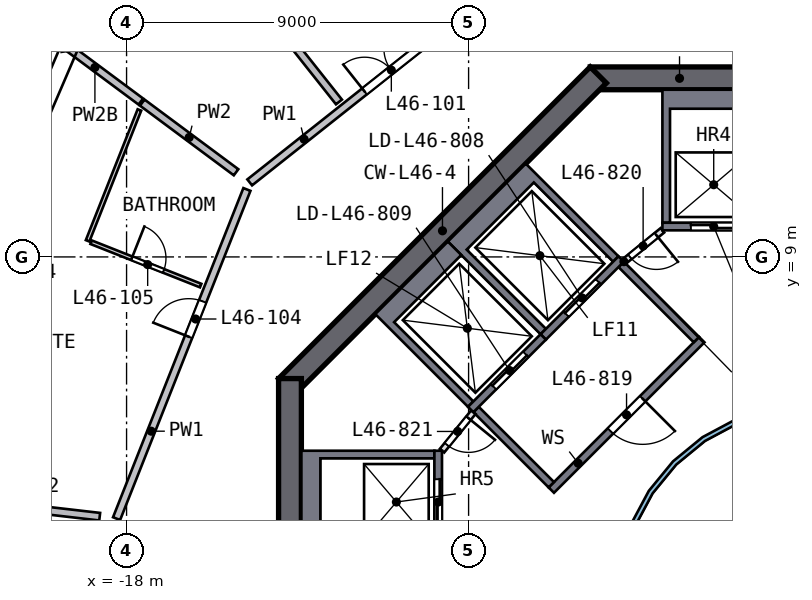
"""IFC4 building model, lengths in metres.
Left out: names, types, materials, properties, quantities, classifications, styles, units other than length and angle.
Written with IfcOpenShell. Run it as: python <this file> out.ifc"""

import sys

from ifc_helpers import new_model, si_unit, direction, frame, frame_2d, origin, origin_2d, place, context, subcontext, project, spatial, polyline, rectangle, outline, extrude, element, fill, save


model = new_model("IFC4")
c1 = context("Model", 3, precision=1e-05, world=origin(), true_north=direction((0.0, 1.0)))
c2 = subcontext(c1, "Body", "Model", "MODEL_VIEW")
j1 = project(units=[si_unit("LENGTHUNIT", "METRE"), si_unit("PLANEANGLEUNIT", "RADIAN")], contexts=[c1])
p1 = place(None, origin())
s1 = spatial("IfcSite", under=j1, at=p1, CompositionType="ELEMENT")
p2 = place(p1, origin())
s2 = spatial("IfcBuilding", under=s1, at=p2, CompositionType="ELEMENT")
p3 = place(p2, frame((0.0, 0.0, 190.5)))
s3 = spatial("IfcBuildingStorey", under=s2, at=p3, CompositionType="ELEMENT", Elevation=190.5)
p4 = place(p3, frame((-19.271, 15.105, 0.0), z_axis=(-0.071073188, -0.092205109, 0.993200292), x_axis=(-0.152064575, 0.985081162, 0.080569652)))
e1 = element("IfcColumn", 1, at=p4, inside=s3, PredefinedType="COLUMN", context=c2, shape_type="SweptSolid", body=[
    extrude(rectangle(XDim=1.0, YDim=0.8, at=origin_2d()), origin(), (0.0, 0.0, 1.0), 3.212),
])
p5 = place(p3, frame((5.799, 13.7, 0.0), z_axis=(0.0, 0.0, 1.0), x_axis=(-1.0, 0.0, 0.0)))
e2 = element("IfcWall", 2, at=p5, inside=s3, PredefinedType="SHEAR", context=c2, shape_type="SweptSolid", body=[
    extrude(rectangle(XDim=11.598, YDim=0.6, at=frame_2d((5.799, 0.0))), origin(), (0.0, 0.0, 1.0), 3.5),
])
p6 = place(p5, frame((4.899, 0.0, 0.0)))
e3 = element("IfcOpeningElement", 3, at=p6, cuts=e2, PredefinedType="OPENING", context=c2, shape_type="SweptSolid", body=[
    extrude(rectangle(XDim=1.8, YDim=2.1, at=frame_2d((0.9, 1.05))), frame((0.0, 0.31, 0.0), z_axis=(0.0, -1.0, 0.0), x_axis=(1.0, 0.0, 0.0)), (0.0, 0.0, 1.0), 0.62),
])
p7 = place(p3, frame((-5.587, 13.788, 0.0), z_axis=(0.0, 0.0, 1.0), x_axis=(-0.707106781, -0.707106781, 0.0)))
e4 = element("IfcWall", 4, at=p7, inside=s3, PredefinedType="SHEAR", context=c2, shape_type="SweptSolid", body=[
    extrude(rectangle(XDim=11.598, YDim=0.6, at=frame_2d((5.799, 0.0))), origin(), (0.0, 0.0, 1.0), 3.5),
])
p8 = place(p3, frame((-13.7, 5.799, 0.0), z_axis=(0.0, 0.0, 1.0), x_axis=(0.0, -1.0, 0.0)))
e5 = element("IfcWall", 5, at=p8, inside=s3, PredefinedType="SHEAR", context=c2, shape_type="SweptSolid", body=[
    extrude(rectangle(XDim=11.598, YDim=0.6, at=frame_2d((5.799, 0.0))), origin(), (0.0, 0.0, 1.0), 3.5),
])
p9 = place(p8, frame((4.899, 0.0, 0.0)))
e6 = element("IfcOpeningElement", 6, at=p9, cuts=e5, PredefinedType="OPENING", context=c2, shape_type="SweptSolid", body=[
    extrude(rectangle(XDim=1.8, YDim=2.1, at=frame_2d((0.9, 1.05))), frame((0.0, 0.31, 0.0), z_axis=(0.0, -1.0, 0.0), x_axis=(1.0, 0.0, 0.0)), (0.0, 0.0, 1.0), 0.62),
])
p10 = place(p3, origin())
e7 = element("IfcWall", 7, at=p10, inside=s3, PredefinedType="SOLIDWALL", context=c2, shape_type="SweptSolid", body=[
    extrude(outline(polyline([(-3.9, 13.4), (-1.2, 13.4), (-1.2, 9.9), (-1.4, 9.9), (-1.4, 12.9), (-3.7, 12.9), (-3.7, 9.9), (-3.9, 9.9), (-3.9, 13.4)])), origin(), (0.0, 0.0, 1.0), 3.19),
])
p11 = place(p3, frame((-1.2, 9.8, 0.0), z_axis=(0.0, 0.0, 1.0), x_axis=(-1.0, 0.0, 0.0)))
e8 = element("IfcWall", 8, at=p11, inside=s3, PredefinedType="SOLIDWALL", context=c2, shape_type="SweptSolid", body=[
    extrude(rectangle(XDim=2.7, YDim=0.2, at=frame_2d((1.35, 0.0))), origin(), (0.0, 0.0, 1.0), 3.19),
])
p12 = place(p11, frame((0.75, 0.0, 0.0)))
e9 = element("IfcOpeningElement", 9, at=p12, cuts=e8, PredefinedType="OPENING", context=c2, shape_type="SweptSolid", body=[
    extrude(rectangle(XDim=1.2, YDim=2.1, at=frame_2d((0.6, 1.05))), frame((0.0, 0.11, 0.0), z_axis=(0.0, -1.0, 0.0), x_axis=(1.0, 0.0, 0.0)), (0.0, 0.0, 1.0), 0.22),
])
p13 = place(p3, origin())
e10 = element("IfcWall", 10, at=p13, inside=s3, PredefinedType="SOLIDWALL", context=c2, shape_type="SweptSolid", body=[
    extrude(outline(polyline([(-13.4, 3.9), (-9.9, 3.9), (-9.9, 3.7), (-12.9, 3.7), (-12.9, 1.4), (-9.9, 1.4), (-9.9, 1.2), (-13.4, 1.2), (-13.4, 3.9)])), origin(), (0.0, 0.0, 1.0), 3.19),
])
p14 = place(p3, frame((-9.8, 1.2, 0.0), z_axis=(0.0, 0.0, 1.0), x_axis=(0.0, 1.0, 0.0)))
e11 = element("IfcWall", 11, at=p14, inside=s3, PredefinedType="SOLIDWALL", context=c2, shape_type="SweptSolid", body=[
    extrude(rectangle(XDim=2.7, YDim=0.2, at=frame_2d((1.35, 0.0))), origin(), (0.0, 0.0, 1.0), 3.19),
])
p15 = place(p14, frame((0.75, 0.0, 0.0)))
e12 = element("IfcOpeningElement", 12, at=p15, cuts=e11, PredefinedType="OPENING", context=c2, shape_type="SweptSolid", body=[
    extrude(rectangle(XDim=1.2, YDim=2.1, at=frame_2d((0.6, 1.05))), frame((0.0, 0.11, 0.0), z_axis=(0.0, -1.0, 0.0), x_axis=(1.0, 0.0, 0.0)), (0.0, 0.0, 1.0), 0.22),
])
p16 = place(p3, origin())
e13 = element("IfcWall", 13, at=p16, inside=s3, PredefinedType="SOLIDWALL", context=c2, shape_type="SweptSolid", body=[
    extrude(outline(polyline([(-9.546, 9.405), (-7.495, 11.455), (-5.056, 9.016), (-5.197, 8.874), (-7.283, 10.96), (-9.051, 9.192), (-6.965, 7.106), (-7.106, 6.965), (-9.546, 9.405)])), origin(), (0.0, 0.0, 1.0), 3.19),
])
p17 = place(p3, frame((-4.985, 8.945, 0.0), z_axis=(0.0, 0.0, 1.0), x_axis=(-0.707106781, -0.707106781, 0.0)))
e14 = element("IfcWall", 14, at=p17, inside=s3, PredefinedType="SOLIDWALL", context=c2, shape_type="SweptSolid", body=[
    extrude(rectangle(XDim=2.9, YDim=0.2, at=frame_2d((1.45, 0.0))), origin(), (0.0, 0.0, 1.0), 3.19),
])
p18 = place(p17, frame((0.85, 0.0, 0.0)))
e15 = element("IfcOpeningElement", 15, at=p18, cuts=e14, PredefinedType="OPENING", context=c2, shape_type="SweptSolid", body=[
    extrude(rectangle(XDim=1.2, YDim=2.1, at=frame_2d((0.6, 1.05))), frame((0.0, 0.11, 0.0), z_axis=(0.0, -1.0, 0.0), x_axis=(1.0, 0.0, 0.0)), (0.0, 0.0, 1.0), 0.22),
])
p19 = place(p3, origin())
e16 = element("IfcWall", 16, at=p19, inside=s3, PredefinedType="SOLIDWALL", context=c2, shape_type="SweptSolid", body=[
    extrude(outline(polyline([(-11.455, 7.495), (-9.546, 9.405), (-9.192, 9.051), (-10.96, 7.283), (-8.874, 5.197), (-9.016, 5.056), (-11.455, 7.495)])), origin(), (0.0, 0.0, 1.0), 3.19),
])
p20 = place(p3, frame((-7.036, 6.894, 0.0), z_axis=(0.0, 0.0, 1.0), x_axis=(-0.707106781, -0.707106781, 0.0)))
e17 = element("IfcWall", 17, at=p20, inside=s3, PredefinedType="SOLIDWALL", context=c2, shape_type="SweptSolid", body=[
    extrude(rectangle(XDim=2.7, YDim=0.2, at=frame_2d((1.35, 0.0))), origin(), (0.0, 0.0, 1.0), 3.19),
])
p21 = place(p20, frame((0.65, 0.0, 0.0)))
e18 = element("IfcOpeningElement", 18, at=p21, cuts=e17, PredefinedType="OPENING", context=c2, shape_type="SweptSolid", body=[
    extrude(rectangle(XDim=1.2, YDim=2.1, at=frame_2d((0.6, 1.05))), frame((0.0, 0.11, 0.0), z_axis=(0.0, -1.0, 0.0), x_axis=(1.0, 0.0, 0.0)), (0.0, 0.0, 1.0), 0.22),
])
p22 = place(p3, frame((-2.864, 6.823, 0.0), z_axis=(0.0, 0.0, 1.0), x_axis=(-0.707106781, -0.707106781, 0.0)))
e19 = element("IfcWall", 19, at=p22, inside=s3, PredefinedType="SOLIDWALL", context=c2, shape_type="SweptSolid", body=[
    extrude(rectangle(XDim=5.6, YDim=0.2, at=frame_2d((2.8, 0.0))), origin(), (0.0, 0.0, 1.0), 3.19),
])
p23 = place(p22, frame((2.2, 0.0, 0.0)))
e20 = element("IfcOpeningElement", 20, at=p23, cuts=e19, PredefinedType="OPENING", context=c2, shape_type="SweptSolid", body=[
    extrude(rectangle(XDim=1.2, YDim=2.1, at=frame_2d((0.6, 1.05))), frame((0.0, 0.11, 0.0), z_axis=(0.0, -1.0, 0.0), x_axis=(1.0, 0.0, 0.0)), (0.0, 0.0, 1.0), 0.22),
])
for number, where, z_axis, x_axis in (
    (21, (-3.005, 6.823, 0.0), (0.0, 0.0, 1.0), (-0.707, 0.707, 0.0)),
    (22, (-6.823, 3.005, 0.0), (0.0, 0.0, 1.0), (-0.707, 0.707, 0.0)),
):
    element("IfcWall", number, at=place(p3, frame(where, z_axis=z_axis, x_axis=x_axis)), inside=s3, PredefinedType="SOLIDWALL", context=c2, shape_type="SweptSolid", body=[
        extrude(rectangle(XDim=2.8, YDim=0.2, at=frame_2d((1.4, 0.0))), origin(), (0.0, 0.0, 1.0), 3.19),
    ])
p24 = place(p3, frame((-3.9, 9.7, 0.0), z_axis=(0.0, 0.0, 1.0), x_axis=(-0.775559878, -0.631274009, 0.0)))
e23 = element("IfcWall", 23, at=p24, inside=s3, PredefinedType="PARTITIONING", context=c2, shape_type="SweptSolid", body=[
    extrude(rectangle(XDim=1.308, YDim=0.15, at=frame_2d((0.654, 0.0))), origin(), (0.0, 0.0, 1.0), 3.19),
])
p25 = place(p24, frame((0.204, 0.0, 0.0)))
e24 = element("IfcOpeningElement", 24, at=p25, cuts=e23, PredefinedType="OPENING", context=c2, shape_type="SweptSolid", body=[
    extrude(rectangle(XDim=0.9, YDim=2.1, at=frame_2d((0.45, 1.05))), frame((0.0, 0.085, 0.0), z_axis=(0.0, -1.0, 0.0), x_axis=(1.0, 0.0, 0.0)), (0.0, 0.0, 1.0), 0.17),
])
p26 = place(p3, frame((-8.874, 4.914, 0.0), z_axis=(0.0, 0.0, 1.0), x_axis=(-0.631274009, -0.775559878, 0.0)))
e25 = element("IfcWall", 25, at=p26, inside=s3, PredefinedType="PARTITIONING", context=c2, shape_type="SweptSolid", body=[
    extrude(rectangle(XDim=1.308, YDim=0.15, at=frame_2d((0.654, 0.0))), origin(), (0.0, 0.0, 1.0), 3.19),
])
p27 = place(p26, frame((0.204, 0.0, 0.0)))
e26 = element("IfcOpeningElement", 26, at=p27, cuts=e25, PredefinedType="OPENING", context=c2, shape_type="SweptSolid", body=[
    extrude(rectangle(XDim=0.9, YDim=2.1, at=frame_2d((0.45, 1.05))), frame((0.0, 0.085, 0.0), z_axis=(0.0, -1.0, 0.0), x_axis=(1.0, 0.0, 0.0)), (0.0, 0.0, 1.0), 0.17),
])
p28 = place(p3, origin())
e27 = element("IfcWall", 27, at=p28, inside=s3, PredefinedType="SOLIDWALL", context=c2, shape_type="SweptSolid", body=[
    extrude(outline(polyline([(5.021, -0.999), (4.73, -1.959), (4.257, -2.844), (3.62, -3.62), (2.844, -4.257), (1.959, -4.73), (0.999, -5.021), (0.0, -5.12), (-0.999, -5.021), (-1.959, -4.73), (-2.844, -4.257), (-3.62, -3.62), (-4.257, -2.844), (-4.73, -1.959), (-5.021, -0.999), (-5.12, 0.0), (-5.021, 0.999), (-4.73, 1.959), (-4.257, 2.844), (-3.62, 3.62), (-2.844, 4.257), (-1.959, 4.73), (-0.999, 5.021), (0.0, 5.12), (0.999, 5.021), (1.959, 4.73), (2.844, 4.257), (3.62, 3.62), (4.257, 2.844), (4.73, 1.959), (5.021, 0.999), (5.12, 0.0), (5.021, -0.999)]), holes=[polyline([(4.904, 0.976), (4.619, 1.913), (4.157, 2.778), (3.535, 3.535), (2.778, 4.157), (1.913, 4.619), (0.976, 4.904), (0.0, 5.0), (-0.976, 4.904), (-1.913, 4.619), (-2.778, 4.157), (-3.535, 3.535), (-4.157, 2.778), (-4.619, 1.913), (-4.904, 0.976), (-5.0, 0.0), (-4.904, -0.976), (-4.619, -1.913), (-4.157, -2.778), (-3.535, -3.535), (-2.778, -4.157), (-1.913, -4.619), (-0.976, -4.904), (0.0, -5.0), (0.976, -4.904), (1.913, -4.619), (2.778, -4.157), (3.535, -3.535), (4.157, -2.778), (4.619, -1.913), (4.904, -0.976), (5.0, 0.0), (4.904, 0.976)])]), origin(), (0.0, 0.0, 1.0), 3.19),
])
p29 = place(p3, frame((-18.263, 2.113, 0.0), z_axis=(0.0, 0.0, 1.0), x_axis=(0.368126327, 0.929775783, 0.0)))
e28 = element("IfcWall", 28, at=p29, inside=s3, PredefinedType="SOLIDWALL", context=c2, shape_type="SweptSolid", body=[
    extrude(rectangle(XDim=9.317, YDim=0.2, at=frame_2d((4.658, 0.0))), origin(), (0.0, 0.0, 1.0), 3.19),
])
p30 = place(p29, frame((5.15, 0.0, 0.0)))
e29 = element("IfcOpeningElement", 29, at=p30, cuts=e28, PredefinedType="OPENING", context=c2, shape_type="SweptSolid", body=[
    extrude(rectangle(XDim=1.0, YDim=2.1, at=frame_2d((0.5, 1.05))), frame((0.0, 0.11, 0.0), z_axis=(0.0, -1.0, 0.0), x_axis=(1.0, 0.0, 0.0)), (0.0, 0.0, 1.0), 0.22),
])
p31 = place(p3, frame((-14.76, 10.961, 0.0), z_axis=(0.0, 0.0, 1.0), x_axis=(0.783683297, 0.621160599, 0.0)))
e30 = element("IfcWall", 30, at=p31, inside=s3, PredefinedType="SOLIDWALL", context=c2, shape_type="SweptSolid", body=[
    extrude(rectangle(XDim=9.317, YDim=0.2, at=frame_2d((4.658, 0.0))), origin(), (0.0, 0.0, 1.0), 3.19),
])
p32 = place(p31, frame((3.855, 0.0, 0.0)))
e31 = element("IfcOpeningElement", 31, at=p32, cuts=e30, PredefinedType="OPENING", context=c2, shape_type="SweptSolid", body=[
    extrude(rectangle(XDim=1.8, YDim=2.1, at=frame_2d((0.9, 1.05))), frame((0.0, 0.11, 0.0), z_axis=(0.0, -1.0, 0.0), x_axis=(1.0, 0.0, 0.0)), (0.0, 0.0, 1.0), 0.22),
])
p33 = place(p3, frame((-18.707, 2.165, 0.0), z_axis=(0.0, 0.0, 1.0), x_axis=(-0.993376903, 0.114901389, 0.0)))
e32 = element("IfcWall", 32, at=p33, inside=s3, PredefinedType="SOLIDWALL", context=c2, shape_type="SweptSolid", body=[
    extrude(rectangle(XDim=3.074, YDim=0.2, at=frame_2d((1.537, 0.0))), origin(), (0.0, 0.0, 1.0), 3.19),
])
p34 = place(p3, frame((-17.624, 13.089, 0.0), z_axis=(0.0, 0.0, 1.0), x_axis=(-0.802773785, 0.596283699, 0.0)))
e33 = element("IfcWall", 33, at=p34, inside=s3, PredefinedType="SOLIDWALL", context=c2, shape_type="SweptSolid", body=[
    extrude(rectangle(XDim=3.011, YDim=0.2, at=frame_2d((1.506, 0.0))), origin(), (0.0, 0.0, 1.0), 2.69),
])
p35 = place(p3, frame((-12.411, 13.078, 0.0), z_axis=(0.0, 0.0, 1.0), x_axis=(-0.62114487, 0.783695764, 0.0)))
e34 = element("IfcWall", 34, at=p35, inside=s3, PredefinedType="SOLIDWALL", context=c2, shape_type="SweptSolid", body=[
    extrude(rectangle(XDim=14.274, YDim=0.2, at=frame_2d((7.137, 0.0))), origin(), (0.0, 0.0, 1.0), 3.19),
])
p36 = place(p35, frame((4.4, 0.0, 0.0)))
e35 = element("IfcOpeningElement", 35, at=p36, cuts=e34, PredefinedType="OPENING", context=c2, shape_type="SweptSolid", body=[
    extrude(rectangle(XDim=1.0, YDim=2.1, at=frame_2d((0.5, 1.05))), frame((0.0, 0.11, 0.0), z_axis=(0.0, -1.0, 0.0), x_axis=(1.0, 0.0, 0.0)), (0.0, 0.0, 1.0), 0.22),
])
p37 = place(p3, frame((-15.119, 11.228, 0.0), z_axis=(0.0, 0.0, 1.0), x_axis=(-0.802820945, 0.596220203, 0.0)))
e36 = element("IfcWall", 36, at=p37, inside=s3, PredefinedType="SOLIDWALL", context=c2, shape_type="SweptSolid", body=[
    extrude(rectangle(XDim=3.075, YDim=0.2, at=frame_2d((1.537, 0.0))), origin(), (0.0, 0.0, 1.0), 3.19),
])
p38 = place(p3, frame((-19.025, 9.424, 0.0), z_axis=(0.0, 0.0, 1.0), x_axis=(0.368126804, 0.929775595, 0.0)))
e37 = element("IfcWall", 37, at=p38, inside=s3, PredefinedType="PARTITIONING", context=c2, shape_type="SweptSolid", body=[
    extrude(rectangle(XDim=3.704, YDim=0.1, at=frame_2d((1.852, 0.0))), origin(), (0.0, 0.0, 1.0), 3.19),
])
p39 = place(p3, frame((-18.932, 9.387, 0.0), z_axis=(0.0, 0.0, 1.0), x_axis=(0.929795945, -0.3680754, 0.0)))
e38 = element("IfcWall", 38, at=p39, inside=s3, PredefinedType="PARTITIONING", context=c2, shape_type="SweptSolid", body=[
    extrude(rectangle(XDim=3.1, YDim=0.1, at=frame_2d((1.55, 0.0))), origin(), (0.0, 0.0, 1.0), 3.19),
])
p40 = place(p39, frame((1.15, 0.0, 0.0)))
e39 = element("IfcOpeningElement", 39, at=p40, cuts=e38, PredefinedType="OPENING", context=c2, shape_type="SweptSolid", body=[
    extrude(rectangle(XDim=0.9, YDim=2.1, at=frame_2d((0.45, 1.05))), frame((0.0, 0.06, 0.0), z_axis=(0.0, -1.0, 0.0), x_axis=(1.0, 0.0, 0.0)), (0.0, 0.0, 1.0), 0.12),
])
p41 = place(p12, origin())
e40 = element("IfcDoor", 40, at=p41, inside=s3, OperationType="DOUBLE_DOOR_SLIDING", PredefinedType="DOOR", context=c2, shape_type="SweptSolid", body=[
    extrude(rectangle(XDim=1.2, YDim=2.1, at=frame_2d((0.6, 1.05))), frame((0.0, 0.025, 0.0), z_axis=(0.0, -1.0, 0.0), x_axis=(1.0, 0.0, 0.0)), (0.0, 0.0, 1.0), 0.05),
])
fill(e9, e40)
p42 = place(p15, origin())
e41 = element("IfcDoor", 41, at=p42, inside=s3, OperationType="DOUBLE_DOOR_SLIDING", PredefinedType="DOOR", context=c2, shape_type="SweptSolid", body=[
    extrude(rectangle(XDim=1.2, YDim=2.1, at=frame_2d((0.6, 1.05))), frame((0.0, 0.025, 0.0), z_axis=(0.0, -1.0, 0.0), x_axis=(1.0, 0.0, 0.0)), (0.0, 0.0, 1.0), 0.05),
])
fill(e12, e41)
p43 = place(p18, origin())
e42 = element("IfcDoor", 42, at=p43, inside=s3, OperationType="DOUBLE_DOOR_SLIDING", PredefinedType="DOOR", context=c2, shape_type="SweptSolid", body=[
    extrude(rectangle(XDim=1.2, YDim=2.1, at=frame_2d((0.6, 1.05))), frame((0.0, 0.025, 0.0), z_axis=(0.0, -1.0, 0.0), x_axis=(1.0, 0.0, 0.0)), (0.0, 0.0, 1.0), 0.05),
])
fill(e15, e42)
p44 = place(p21, origin())
e43 = element("IfcDoor", 43, at=p44, inside=s3, OperationType="DOUBLE_DOOR_SLIDING", PredefinedType="DOOR", context=c2, shape_type="SweptSolid", body=[
    extrude(rectangle(XDim=1.2, YDim=2.1, at=frame_2d((0.6, 1.05))), frame((0.0, 0.025, 0.0), z_axis=(0.0, -1.0, 0.0), x_axis=(1.0, 0.0, 0.0)), (0.0, 0.0, 1.0), 0.05),
])
fill(e18, e43)
p45 = place(p23, origin())
e44 = element("IfcDoor", 44, at=p45, inside=s3, OperationType="SINGLE_SWING_LEFT", PredefinedType="DOOR", context=c2, shape_type="SweptSolid", body=[
    extrude(rectangle(XDim=1.2, YDim=2.1, at=frame_2d((0.6, 1.05))), frame((0.0, 0.025, 0.0), z_axis=(0.0, -1.0, 0.0), x_axis=(1.0, 0.0, 0.0)), (0.0, 0.0, 1.0), 0.05),
])
fill(e20, e44)
p46 = place(p25, origin())
e45 = element("IfcDoor", 45, at=p46, inside=s3, OperationType="SINGLE_SWING_LEFT", PredefinedType="DOOR", context=c2, shape_type="SweptSolid", body=[
    extrude(rectangle(XDim=0.9, YDim=2.1, at=frame_2d((0.45, 1.05))), frame((0.0, 0.025, 0.0), z_axis=(0.0, -1.0, 0.0), x_axis=(1.0, 0.0, 0.0)), (0.0, 0.0, 1.0), 0.05),
])
fill(e24, e45)
p47 = place(p27, origin())
e46 = element("IfcDoor", 46, at=p47, inside=s3, OperationType="SINGLE_SWING_LEFT", PredefinedType="DOOR", context=c2, shape_type="SweptSolid", body=[
    extrude(rectangle(XDim=0.9, YDim=2.1, at=frame_2d((0.45, 1.05))), frame((0.0, 0.025, 0.0), z_axis=(0.0, -1.0, 0.0), x_axis=(1.0, 0.0, 0.0)), (0.0, 0.0, 1.0), 0.05),
])
fill(e26, e46)
p48 = place(p32, origin())
e47 = element("IfcDoor", 47, at=p48, inside=s3, OperationType="DOUBLE_DOOR_SINGLE_SWING", PredefinedType="DOOR", context=c2, shape_type="SweptSolid", body=[
    extrude(rectangle(XDim=1.8, YDim=2.1, at=frame_2d((0.9, 1.05))), frame((0.0, 0.025, 0.0), z_axis=(0.0, -1.0, 0.0), x_axis=(1.0, 0.0, 0.0)), (0.0, 0.0, 1.0), 0.05),
])
fill(e31, e47)
p49 = place(p30, origin())
e48 = element("IfcDoor", 48, at=p49, inside=s3, OperationType="SINGLE_SWING_LEFT", PredefinedType="DOOR", context=c2, shape_type="SweptSolid", body=[
    extrude(rectangle(XDim=1.0, YDim=2.1, at=frame_2d((0.5, 1.05))), frame((0.0, 0.025, 0.0), z_axis=(0.0, -1.0, 0.0), x_axis=(1.0, 0.0, 0.0)), (0.0, 0.0, 1.0), 0.05),
])
fill(e29, e48)
p50 = place(p40, origin())
e49 = element("IfcDoor", 49, at=p50, inside=s3, OperationType="SINGLE_SWING_LEFT", PredefinedType="DOOR", context=c2, shape_type="SweptSolid", body=[
    extrude(rectangle(XDim=0.9, YDim=2.1, at=frame_2d((0.45, 1.05))), frame((0.0, 0.025, 0.0), z_axis=(0.0, -1.0, 0.0), x_axis=(1.0, 0.0, 0.0)), (0.0, 0.0, 1.0), 0.05),
])
fill(e39, e49)
save(model, sys.argv[1])
